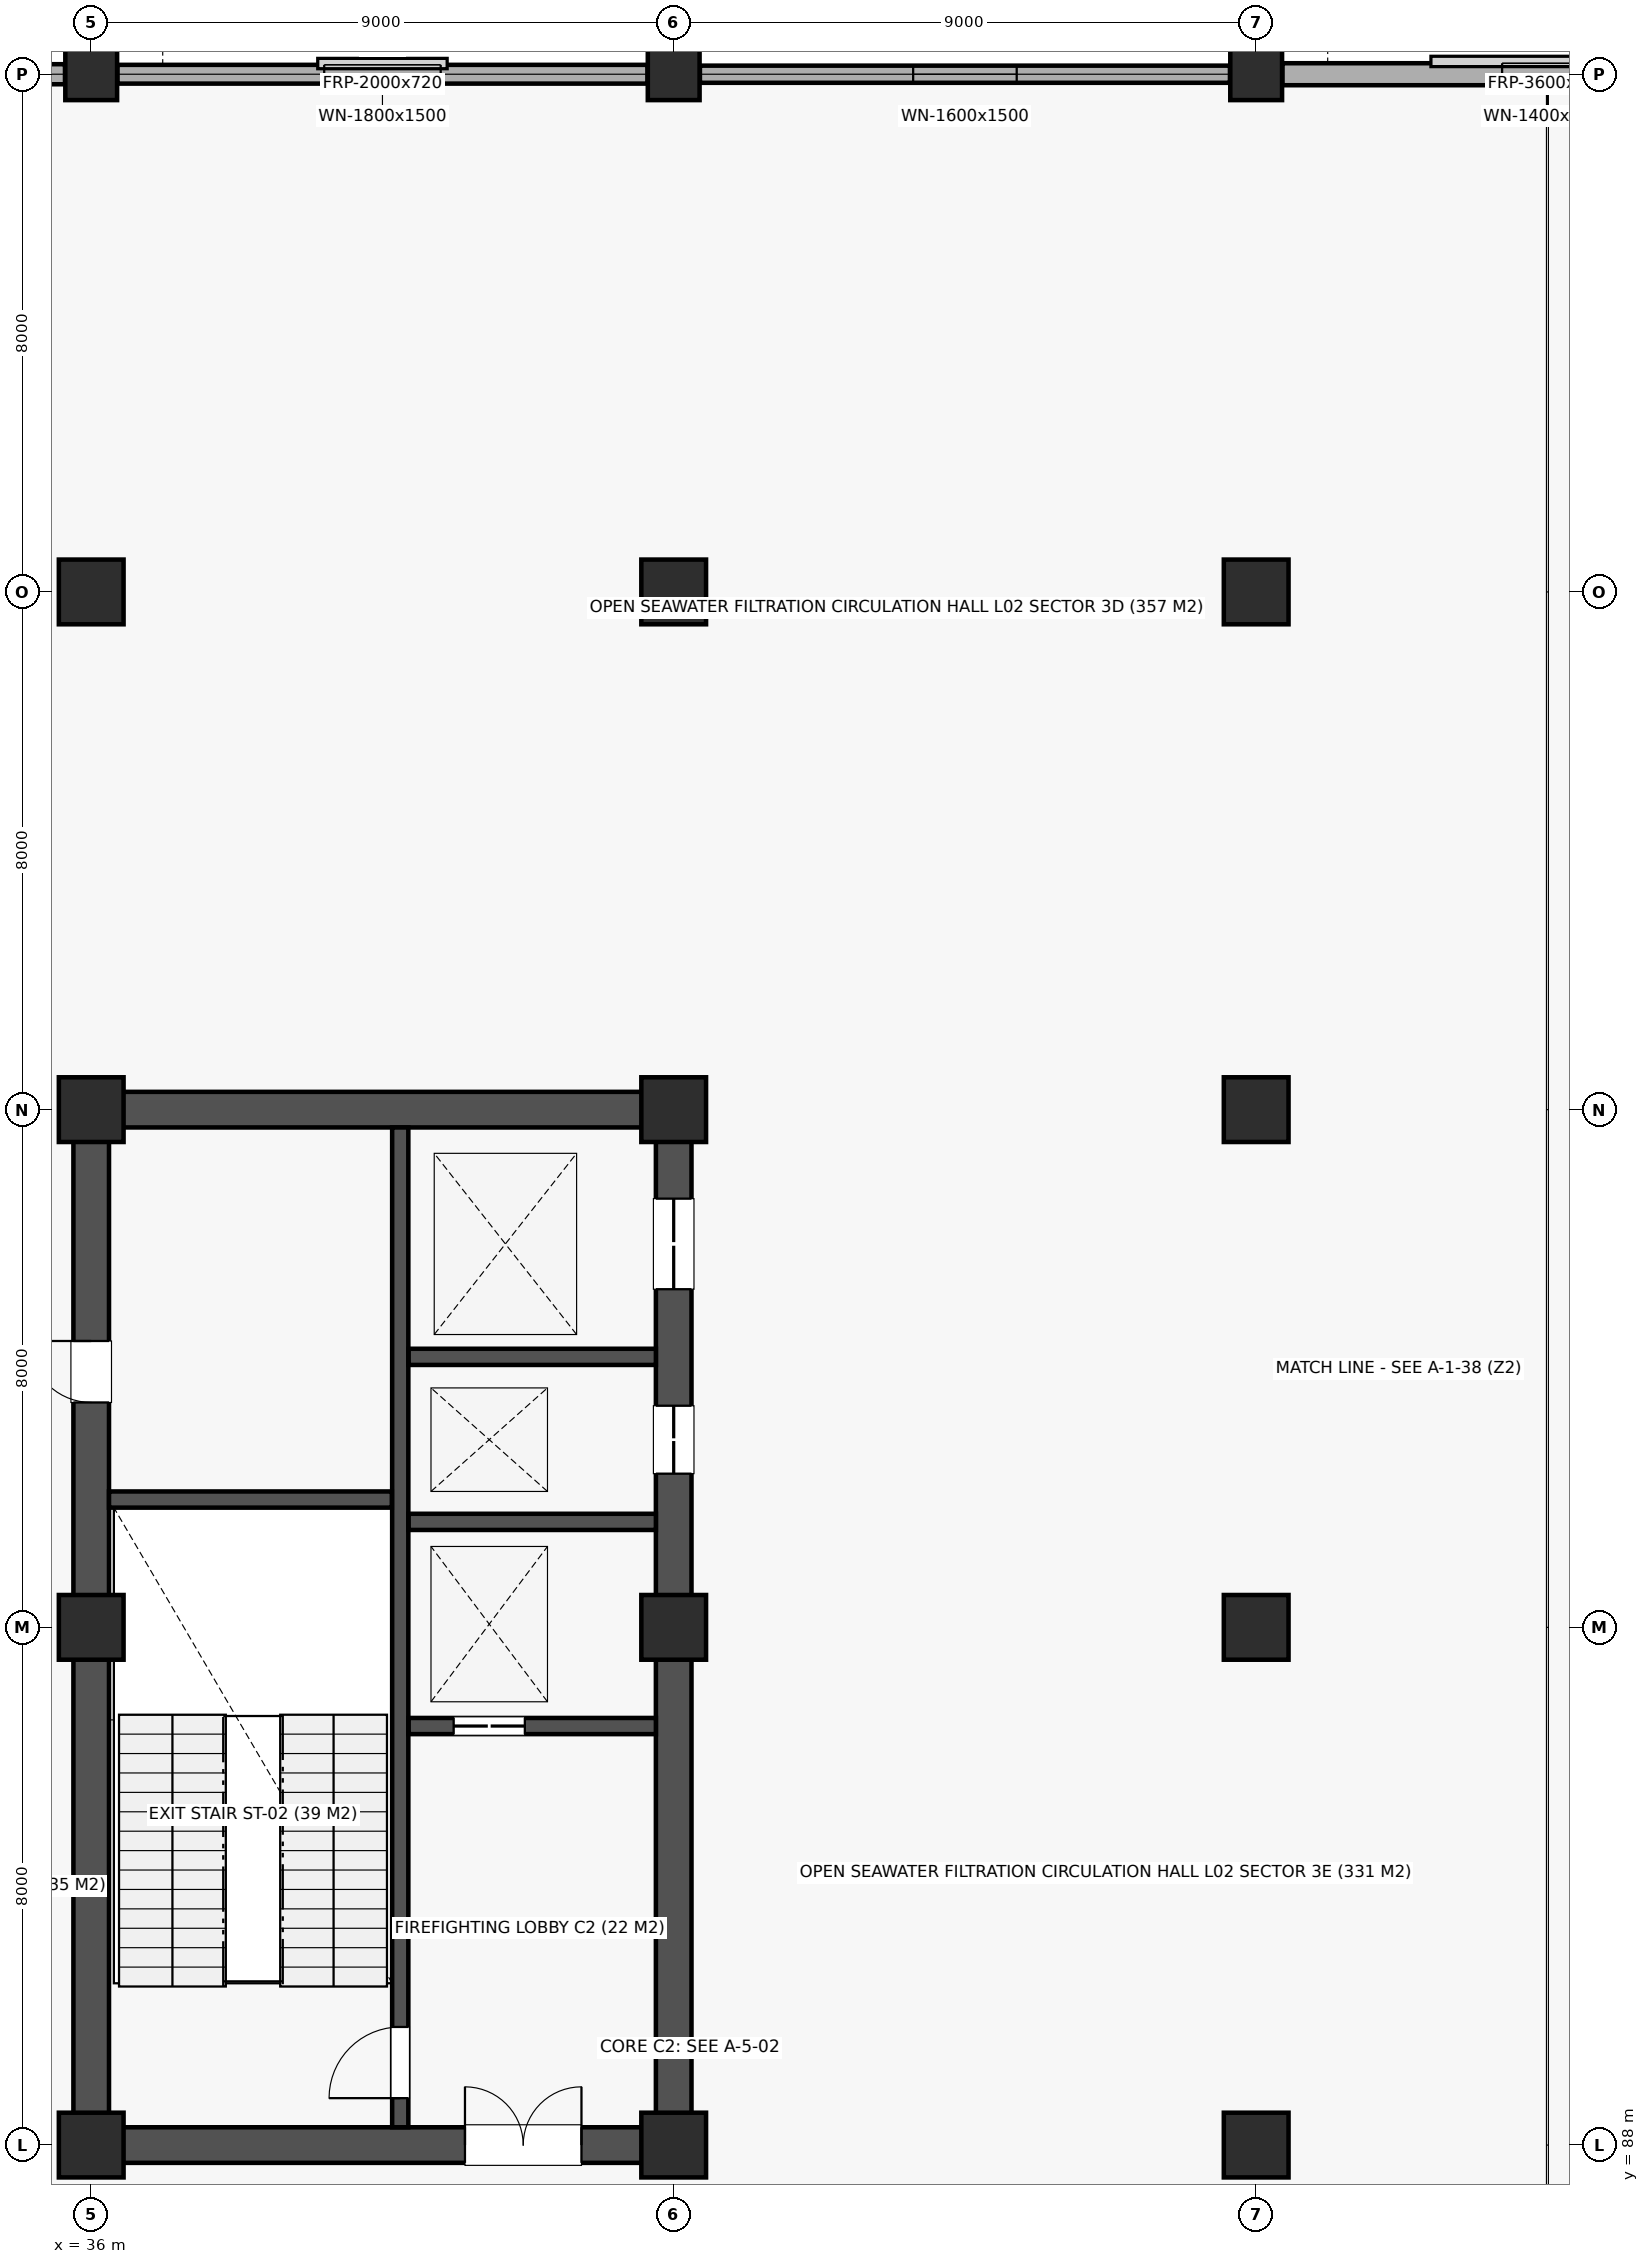
"""IFC4 building model, lengths in metres.
Left out: names, types, materials, properties, quantities, classifications, styles, units other than length and angle.
Written with IfcOpenShell. Run it as: python <this file> out.ifc"""

import sys

from ifc_helpers import new_model, si_unit, direction, frame, frame_2d, origin, origin_2d, place, context, subcontext, project, spatial, rectangle, extrude, element, fill, save


model = new_model("IFC4")
c1 = context("Model", 3, precision=1e-05, world=origin(), true_north=direction((0.0, 1.0)))
c2 = subcontext(c1, "Body", "Model", "MODEL_VIEW")
j1 = project(units=[si_unit("LENGTHUNIT", "METRE"), si_unit("PLANEANGLEUNIT", "RADIAN")], contexts=[c1])
p1 = place(None, origin())
s1 = spatial("IfcSite", under=j1, at=p1, CompositionType="ELEMENT")
p2 = place(p1, origin())
s2 = spatial("IfcBuilding", under=s1, at=p2, CompositionType="ELEMENT")
p3 = place(p2, frame((0.0, 0.0, 9.0)))
s3 = spatial("IfcBuildingStorey", under=s2, at=p3, CompositionType="ELEMENT", Elevation=9.0)
for number, where, z_axis, x_axis in (
    (1, (36.0, 88.0, 0.0), (0.0, 0.0, 1.0), (1.0, 0.0, 0.0)),
    (2, (36.0, 96.0, 0.0), (0.0, 0.0, 1.0), (1.0, 0.0, 0.0)),
    (3, (36.0, 104.0, 0.0), (0.0, 0.0, 1.0), (1.0, 0.0, 0.0)),
    (4, (36.0, 112.0, 0.0), (0.0, 0.0, 1.0), (1.0, 0.0, 0.0)),
):
    element("IfcColumn", number, at=place(p3, frame(where, z_axis=z_axis, x_axis=x_axis)), inside=s3, PredefinedType="COLUMN", context=c2, shape_type="SweptSolid", body=[
        extrude(rectangle(XDim=1.0, YDim=1.0, at=origin_2d()), origin(), (0.0, 0.0, 1.0), 4.5),
    ])
p4 = place(p3, frame((36.0, 120.0, 0.0), z_axis=(0.0, 0.0, 1.0), x_axis=(1.0, 0.0, 0.0)))
e5 = element("IfcColumn", 5, at=p4, inside=s3, PredefinedType="COLUMN", context=c2, shape_type="SweptSolid", body=[
    extrude(rectangle(XDim=0.8, YDim=0.8, at=origin_2d()), origin(), (0.0, 0.0, 1.0), 4.5),
])
for number, where, z_axis, x_axis in (
    (6, (45.0, 88.0, 0.0), (0.0, 0.0, 1.0), (1.0, 0.0, 0.0)),
    (7, (45.0, 96.0, 0.0), (0.0, 0.0, 1.0), (1.0, 0.0, 0.0)),
    (8, (45.0, 104.0, 0.0), (0.0, 0.0, 1.0), (1.0, 0.0, 0.0)),
    (9, (45.0, 112.0, 0.0), (0.0, 0.0, 1.0), (1.0, 0.0, 0.0)),
):
    element("IfcColumn", number, at=place(p3, frame(where, z_axis=z_axis, x_axis=x_axis)), inside=s3, PredefinedType="COLUMN", context=c2, shape_type="SweptSolid", body=[
        extrude(rectangle(XDim=1.0, YDim=1.0, at=origin_2d()), origin(), (0.0, 0.0, 1.0), 4.5),
    ])
p5 = place(p3, frame((45.0, 120.0, 0.0), z_axis=(0.0, 0.0, 1.0), x_axis=(1.0, 0.0, 0.0)))
e10 = element("IfcColumn", 10, at=p5, inside=s3, PredefinedType="COLUMN", context=c2, shape_type="SweptSolid", body=[
    extrude(rectangle(XDim=0.8, YDim=0.8, at=origin_2d()), origin(), (0.0, 0.0, 1.0), 4.5),
])
for number, where, z_axis, x_axis in (
    (11, (54.0, 88.0, 0.0), (0.0, 0.0, 1.0), (1.0, 0.0, 0.0)),
    (12, (54.0, 96.0, 0.0), (0.0, 0.0, 1.0), (1.0, 0.0, 0.0)),
    (13, (54.0, 104.0, 0.0), (0.0, 0.0, 1.0), (1.0, 0.0, 0.0)),
    (14, (54.0, 112.0, 0.0), (0.0, 0.0, 1.0), (1.0, 0.0, 0.0)),
):
    element("IfcColumn", number, at=place(p3, frame(where, z_axis=z_axis, x_axis=x_axis)), inside=s3, PredefinedType="COLUMN", context=c2, shape_type="SweptSolid", body=[
        extrude(rectangle(XDim=1.0, YDim=1.0, at=origin_2d()), origin(), (0.0, 0.0, 1.0), 4.5),
    ])
p6 = place(p3, frame((54.0, 120.0, 0.0), z_axis=(0.0, 0.0, 1.0), x_axis=(1.0, 0.0, 0.0)))
e15 = element("IfcColumn", 15, at=p6, inside=s3, PredefinedType="COLUMN", context=c2, shape_type="SweptSolid", body=[
    extrude(rectangle(XDim=0.8, YDim=0.8, at=origin_2d()), origin(), (0.0, 0.0, 1.0), 4.5),
])
p7 = place(p3, frame((36.275, 88.0, 0.0), z_axis=(0.0, 0.0, 1.0), x_axis=(1.0, 0.0, 0.0)))
e16 = element("IfcWall", 16, at=p7, inside=s3, PredefinedType="SHEAR", context=c2, shape_type="SweptSolid", body=[
    extrude(rectangle(XDim=8.45, YDim=0.55, at=frame_2d((4.225, 0.0))), origin(), (0.0, 0.0, 1.0), 4.14),
])
p8 = place(p7, frame((5.5, 0.0, 0.0)))
e17 = element("IfcOpeningElement", 17, at=p8, cuts=e16, PredefinedType="OPENING", context=c2, shape_type="SweptSolid", body=[
    extrude(rectangle(XDim=1.8, YDim=2.18, at=frame_2d((0.9, 1.09))), frame((0.0, 0.287, 0.0), z_axis=(0.0, -1.0, 0.0), x_axis=(1.0, 0.0, 0.0)), (0.0, 0.0, 1.0), 0.574),
])
p9 = place(p3, frame((36.275, 104.0, 0.0), z_axis=(0.0, 0.0, 1.0), x_axis=(1.0, 0.0, 0.0)))
e18 = element("IfcWall", 18, at=p9, inside=s3, PredefinedType="SHEAR", context=c2, shape_type="SweptSolid", body=[
    extrude(rectangle(XDim=8.45, YDim=0.55, at=frame_2d((4.225, 0.0))), origin(), (0.0, 0.0, 1.0), 4.14),
])
p10 = place(p3, frame((36.0, 88.275, 0.0), z_axis=(0.0, 0.0, 1.0), x_axis=(0.0, 1.0, 0.0)))
e19 = element("IfcWall", 19, at=p10, inside=s3, PredefinedType="SHEAR", context=c2, shape_type="SweptSolid", body=[
    extrude(rectangle(XDim=15.45, YDim=0.55, at=frame_2d((7.725, 0.0))), origin(), (0.0, 0.0, 1.0), 4.14),
])
p11 = place(p10, frame((11.2, 0.0, 0.0)))
e20 = element("IfcOpeningElement", 20, at=p11, cuts=e19, PredefinedType="OPENING", context=c2, shape_type="SweptSolid", body=[
    extrude(rectangle(XDim=0.95, YDim=2.1, at=frame_2d((0.475, 1.05))), frame((0.0, 0.287, 0.0), z_axis=(0.0, -1.0, 0.0), x_axis=(1.0, 0.0, 0.0)), (0.0, 0.0, 1.0), 0.574),
])
p12 = place(p3, frame((45.0, 88.275, 0.0), z_axis=(0.0, 0.0, 1.0), x_axis=(0.0, 1.0, 0.0)))
e21 = element("IfcWall", 21, at=p12, inside=s3, PredefinedType="SHEAR", context=c2, shape_type="SweptSolid", body=[
    extrude(rectangle(XDim=15.45, YDim=0.55, at=frame_2d((7.725, 0.0))), origin(), (0.0, 0.0, 1.0), 4.14),
])
p13 = place(p12, frame((10.1, 0.0, 0.0)))
e22 = element("IfcOpeningElement", 22, at=p13, cuts=e21, PredefinedType="OPENING", context=c2, shape_type="SweptSolid", body=[
    extrude(rectangle(XDim=1.05, YDim=2.12, at=frame_2d((0.525, 1.06))), frame((0.0, 0.287, 0.0), z_axis=(0.0, -1.0, 0.0), x_axis=(1.0, 0.0, 0.0)), (0.0, 0.0, 1.0), 0.574),
])
p14 = place(p12, frame((12.95, 0.0, 0.0)))
e23 = element("IfcOpeningElement", 23, at=p14, cuts=e21, PredefinedType="OPENING", context=c2, shape_type="SweptSolid", body=[
    extrude(rectangle(XDim=1.4, YDim=2.2, at=frame_2d((0.7, 1.1))), frame((0.0, 0.287, 0.0), z_axis=(0.0, -1.0, 0.0), x_axis=(1.0, 0.0, 0.0)), (0.0, 0.0, 1.0), 0.574),
])
p15 = place(p3, frame((40.775, 88.275, 0.0), z_axis=(0.0, 0.0, 1.0), x_axis=(0.0, 1.0, 0.0)))
e24 = element("IfcWall", 24, at=p15, inside=s3, PredefinedType="SOLIDWALL", context=c2, shape_type="SweptSolid", body=[
    extrude(rectangle(XDim=15.45, YDim=0.25, at=frame_2d((7.725, 0.0))), origin(), (0.0, 0.0, 1.0), 4.14),
])
p16 = place(p15, frame((0.45, 0.0, 0.0)))
e25 = element("IfcOpeningElement", 25, at=p16, cuts=e24, PredefinedType="OPENING", context=c2, shape_type="SweptSolid", body=[
    extrude(rectangle(XDim=1.1, YDim=2.15, at=frame_2d((0.55, 1.075))), frame((0.0, 0.137, 0.0), z_axis=(0.0, -1.0, 0.0), x_axis=(1.0, 0.0, 0.0)), (0.0, 0.0, 1.0), 0.274),
])
p17 = place(p3, frame((36.275, 97.975, 0.0), z_axis=(0.0, 0.0, 1.0), x_axis=(1.0, 0.0, 0.0)))
e26 = element("IfcWall", 26, at=p17, inside=s3, PredefinedType="SOLIDWALL", context=c2, shape_type="SweptSolid", body=[
    extrude(rectangle(XDim=4.37, YDim=0.25, at=frame_2d((2.185, 0.0))), origin(), (0.0, 0.0, 1.0), 4.14),
])
p18 = place(p3, frame((40.905, 94.475, 0.0), z_axis=(0.0, 0.0, 1.0), x_axis=(1.0, 0.0, 0.0)))
e27 = element("IfcWall", 27, at=p18, inside=s3, PredefinedType="SOLIDWALL", context=c2, shape_type="SweptSolid", body=[
    extrude(rectangle(XDim=3.82, YDim=0.25, at=frame_2d((1.91, 0.0))), origin(), (0.0, 0.0, 1.0), 4.14),
])
p19 = place(p18, frame((0.695, 0.0, 0.0)))
e28 = element("IfcOpeningElement", 28, at=p19, cuts=e27, PredefinedType="OPENING", context=c2, shape_type="SweptSolid", body=[
    extrude(rectangle(XDim=1.1, YDim=2.12, at=frame_2d((0.55, 1.06))), frame((0.0, 0.137, 0.0), z_axis=(0.0, -1.0, 0.0), x_axis=(1.0, 0.0, 0.0)), (0.0, 0.0, 1.0), 0.274),
])
for number, where, z_axis, x_axis in (
    (29, (40.905, 97.63, 0.0), (0.0, 0.0, 1.0), (1.0, 0.0, 0.0)),
    (30, (40.905, 100.18, 0.0), (0.0, 0.0, 1.0), (1.0, 0.0, 0.0)),
):
    element("IfcWall", number, at=place(p3, frame(where, z_axis=z_axis, x_axis=x_axis)), inside=s3, PredefinedType="SOLIDWALL", context=c2, shape_type="SweptSolid", body=[
        extrude(rectangle(XDim=3.82, YDim=0.25, at=frame_2d((1.91, 0.0))), origin(), (0.0, 0.0, 1.0), 4.14),
    ])
p20 = place(p3, frame((27.405, 120.0, 0.0), z_axis=(0.0, 0.0, 1.0), x_axis=(1.0, 0.0, 0.0)))
e31 = element("IfcWall", 31, at=p20, inside=s3, PredefinedType="STANDARD", context=c2, shape_type="SweptSolid", body=[
    extrude(rectangle(XDim=8.19, YDim=0.31, at=frame_2d((4.095, 0.0))), origin(), (0.0, 0.0, 1.0), 3.42),
])
p21 = place(p20, frame((3.095, 0.0, 0.85)))
e32 = element("IfcOpeningElement", 32, at=p21, cuts=e31, PredefinedType="OPENING", context=c2, shape_type="SweptSolid", body=[
    extrude(rectangle(XDim=2.0, YDim=1.5, at=frame_2d((1.0, 0.75))), frame((0.0, 0.167, 0.0), z_axis=(0.0, -1.0, 0.0), x_axis=(1.0, 0.0, 0.0)), (0.0, 0.0, 1.0), 0.334),
])
p22 = place(p3, frame((36.405, 120.0, 0.0), z_axis=(0.0, 0.0, 1.0), x_axis=(1.0, 0.0, 0.0)))
e33 = element("IfcWall", 33, at=p22, inside=s3, PredefinedType="STANDARD", context=c2, shape_type="SweptSolid", body=[
    extrude(rectangle(XDim=8.19, YDim=0.29, at=frame_2d((4.095, 0.0))), origin(), (0.0, 0.0, 1.0), 3.42),
])
p23 = place(p22, frame((3.195, 0.0, 0.85)))
e34 = element("IfcOpeningElement", 34, at=p23, cuts=e33, PredefinedType="OPENING", context=c2, shape_type="SweptSolid", body=[
    extrude(rectangle(XDim=1.8, YDim=1.5, at=frame_2d((0.9, 0.75))), frame((0.0, 0.157, 0.0), z_axis=(0.0, -1.0, 0.0), x_axis=(1.0, 0.0, 0.0)), (0.0, 0.0, 1.0), 0.314),
])
p24 = place(p3, frame((45.405, 120.0, 0.0), z_axis=(0.0, 0.0, 1.0), x_axis=(1.0, 0.0, 0.0)))
e35 = element("IfcWall", 35, at=p24, inside=s3, PredefinedType="STANDARD", context=c2, shape_type="SweptSolid", body=[
    extrude(rectangle(XDim=8.19, YDim=0.265, at=frame_2d((4.095, 0.0))), origin(), (0.0, 0.0, 1.0), 3.42),
])
p25 = place(p24, frame((3.295, 0.0, 0.85)))
e36 = element("IfcOpeningElement", 36, at=p25, cuts=e35, PredefinedType="OPENING", context=c2, shape_type="SweptSolid", body=[
    extrude(rectangle(XDim=1.6, YDim=1.5, at=frame_2d((0.8, 0.75))), frame((0.0, 0.145, 0.0), z_axis=(0.0, -1.0, 0.0), x_axis=(1.0, 0.0, 0.0)), (0.0, 0.0, 1.0), 0.289),
])
p26 = place(p3, frame((54.405, 120.0, 0.0), z_axis=(0.0, 0.0, 1.0), x_axis=(1.0, 0.0, 0.0)))
e37 = element("IfcWall", 37, at=p26, inside=s3, PredefinedType="STANDARD", context=c2, shape_type="SweptSolid", body=[
    extrude(rectangle(XDim=8.19, YDim=0.34, at=frame_2d((4.095, 0.0))), origin(), (0.0, 0.0, 1.0), 3.42),
])
p27 = place(p26, frame((3.395, 0.0, 0.85)))
e38 = element("IfcOpeningElement", 38, at=p27, cuts=e37, PredefinedType="OPENING", context=c2, shape_type="SweptSolid", body=[
    extrude(rectangle(XDim=1.4, YDim=1.5, at=frame_2d((0.7, 0.75))), frame((0.0, 0.182, 0.0), z_axis=(0.0, -1.0, 0.0), x_axis=(1.0, 0.0, 0.0)), (0.0, 0.0, 1.0), 0.364),
])
p28 = place(p8, origin())
e39 = element("IfcDoor", 39, at=p28, inside=s3, OperationType="DOUBLE_DOOR_SINGLE_SWING", PredefinedType="DOOR", context=c2, shape_type="SweptSolid", body=[
    extrude(rectangle(XDim=1.8, YDim=2.18, at=frame_2d((0.9, 1.09))), frame((0.0, 0.025, 0.0), z_axis=(0.0, -1.0, 0.0), x_axis=(1.0, 0.0, 0.0)), (0.0, 0.0, 1.0), 0.05),
])
fill(e17, e39)
p29 = place(p16, origin())
e40 = element("IfcDoor", 40, at=p29, inside=s3, OperationType="SINGLE_SWING_LEFT", PredefinedType="DOOR", context=c2, shape_type="SweptSolid", body=[
    extrude(rectangle(XDim=1.1, YDim=2.15, at=frame_2d((0.55, 1.075))), frame((0.0, 0.025, 0.0), z_axis=(0.0, -1.0, 0.0), x_axis=(1.0, 0.0, 0.0)), (0.0, 0.0, 1.0), 0.05),
])
fill(e25, e40)
p30 = place(p11, origin())
e41 = element("IfcDoor", 41, at=p30, inside=s3, OperationType="SINGLE_SWING_RIGHT", PredefinedType="DOOR", context=c2, shape_type="SweptSolid", body=[
    extrude(rectangle(XDim=0.95, YDim=2.1, at=frame_2d((0.475, 1.05))), frame((0.0, 0.025, 0.0), z_axis=(0.0, -1.0, 0.0), x_axis=(1.0, 0.0, 0.0)), (0.0, 0.0, 1.0), 0.05),
])
fill(e20, e41)
p31 = place(p19, origin())
e42 = element("IfcDoor", 42, at=p31, inside=s3, OperationType="DOUBLE_DOOR_SLIDING", PredefinedType="DOOR", context=c2, shape_type="SweptSolid", body=[
    extrude(rectangle(XDim=1.1, YDim=2.12, at=frame_2d((0.55, 1.06))), frame((0.0, 0.025, 0.0), z_axis=(0.0, -1.0, 0.0), x_axis=(1.0, 0.0, 0.0)), (0.0, 0.0, 1.0), 0.05),
])
fill(e28, e42)
p32 = place(p13, origin())
e43 = element("IfcDoor", 43, at=p32, inside=s3, OperationType="DOUBLE_DOOR_SLIDING", PredefinedType="DOOR", context=c2, shape_type="SweptSolid", body=[
    extrude(rectangle(XDim=1.05, YDim=2.12, at=frame_2d((0.525, 1.06))), frame((0.0, 0.025, 0.0), z_axis=(0.0, -1.0, 0.0), x_axis=(1.0, 0.0, 0.0)), (0.0, 0.0, 1.0), 0.05),
])
fill(e22, e43)
p33 = place(p14, origin())
e44 = element("IfcDoor", 44, at=p33, inside=s3, OperationType="DOUBLE_DOOR_SLIDING", PredefinedType="DOOR", context=c2, shape_type="SweptSolid", body=[
    extrude(rectangle(XDim=1.4, YDim=2.2, at=frame_2d((0.7, 1.1))), frame((0.0, 0.025, 0.0), z_axis=(0.0, -1.0, 0.0), x_axis=(1.0, 0.0, 0.0)), (0.0, 0.0, 1.0), 0.05),
])
fill(e23, e44)
p34 = place(p23, origin())
e45 = element("IfcWindow", 45, at=p34, inside=s3, PartitioningType="SINGLE_PANEL", PredefinedType="WINDOW", context=c2, shape_type="SweptSolid", body=[
    extrude(rectangle(XDim=1.8, YDim=1.5, at=frame_2d((0.9, 0.75))), frame((0.0, 0.03, 0.0), z_axis=(0.0, -1.0, 0.0), x_axis=(1.0, 0.0, 0.0)), (0.0, 0.0, 1.0), 0.06),
])
fill(e34, e45)
p35 = place(p25, origin())
e46 = element("IfcWindow", 46, at=p35, inside=s3, PartitioningType="SINGLE_PANEL", PredefinedType="WINDOW", context=c2, shape_type="SweptSolid", body=[
    extrude(rectangle(XDim=1.6, YDim=1.5, at=frame_2d((0.8, 0.75))), frame((0.0, 0.03, 0.0), z_axis=(0.0, -1.0, 0.0), x_axis=(1.0, 0.0, 0.0)), (0.0, 0.0, 1.0), 0.06),
])
fill(e36, e46)
p36 = place(p27, origin())
e47 = element("IfcWindow", 47, at=p36, inside=s3, PartitioningType="SINGLE_PANEL", PredefinedType="WINDOW", context=c2, shape_type="SweptSolid", body=[
    extrude(rectangle(XDim=1.4, YDim=1.5, at=frame_2d((0.7, 0.75))), frame((0.0, 0.03, 0.0), z_axis=(0.0, -1.0, 0.0), x_axis=(1.0, 0.0, 0.0)), (0.0, 0.0, 1.0), 0.06),
])
fill(e38, e47)
save(model, sys.argv[1])
